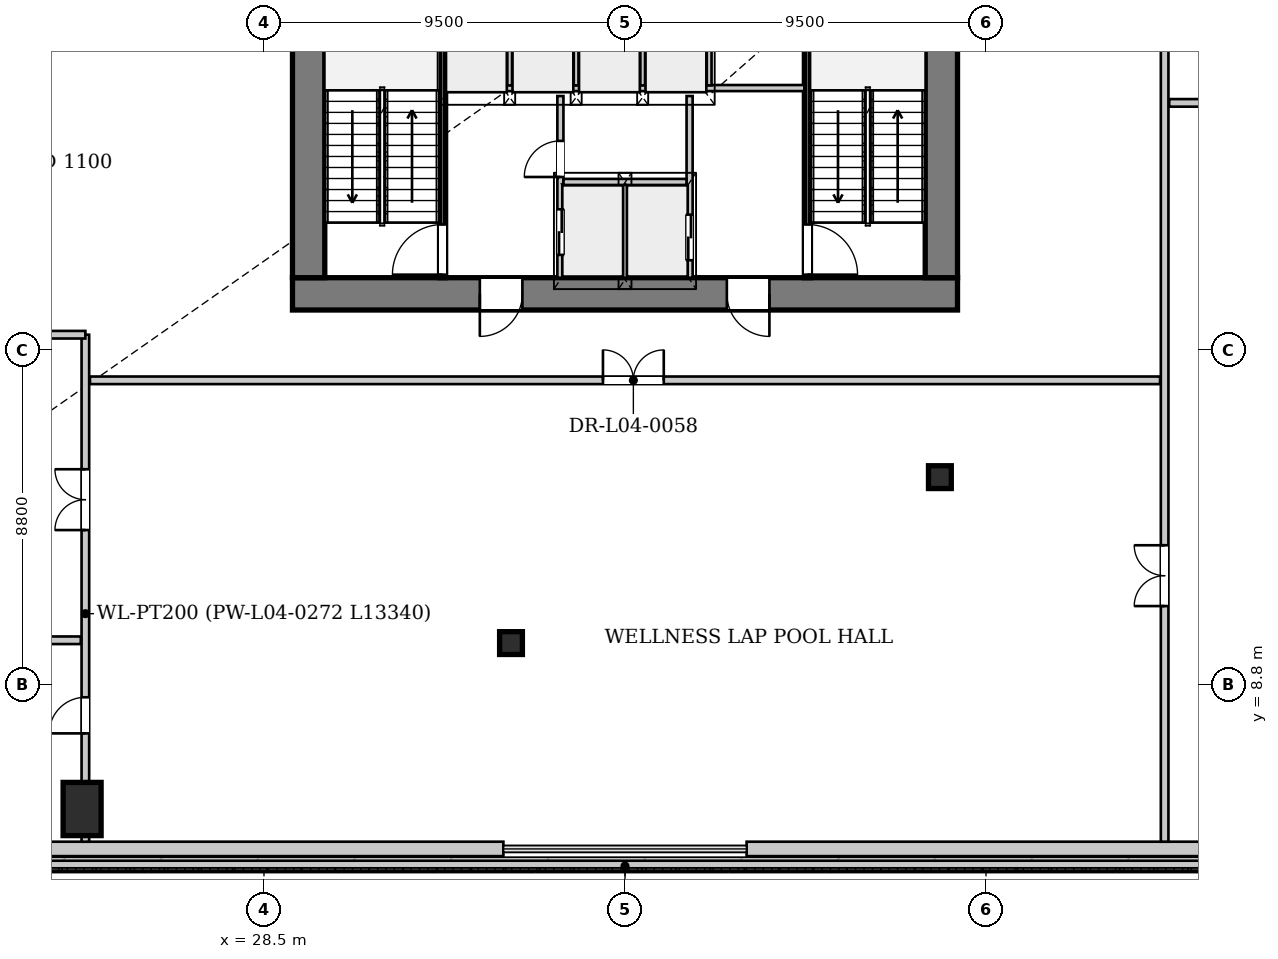
"""IFC4 building model, lengths in metres.
Left out: names, types, materials, properties, quantities, classifications, styles, units other than length and angle.
Written with IfcOpenShell. Run it as: python <this file> out.ifc"""

import sys

from ifc_helpers import new_model, si_unit, direction, frame, frame_2d, origin, origin_2d, place, context, subcontext, project, spatial, rectangle, hollow_rectangle, extrude, source, transform, mapped, element, fill, save


model = new_model("IFC4")
c1 = context("Model", 3, precision=1e-05, world=origin(), true_north=direction((0.0, 1.0)))
c2 = subcontext(c1, "Body", "Model", "MODEL_VIEW")
j1 = project(units=[si_unit("LENGTHUNIT", "METRE"), si_unit("PLANEANGLEUNIT", "RADIAN")], contexts=[c1])
p1 = place(None, origin())
s1 = spatial("IfcSite", under=j1, at=p1, CompositionType="ELEMENT")
p2 = place(p1, origin())
s2 = spatial("IfcBuilding", under=s1, at=p2, CompositionType="ELEMENT")
p3 = place(p2, frame((0.0, 0.0, 20.1)))
s3 = spatial("IfcBuildingStorey", under=s2, at=p3, CompositionType="ELEMENT", Elevation=20.1)
m1 = source(origin(), c2, "Body", "SweptSolid", [
    extrude(rectangle(XDim=1.0, YDim=1.4, at=origin_2d()), origin(), (0.0, 0.0, 1.0), 4.335),
])
p4 = place(p3, frame((23.714, 5.52, 0.0), z_axis=(0.0, 0.0, 1.0), x_axis=(1.0, 0.0, 0.0)))
e1 = element("IfcColumn", 1, at=p4, inside=s3, PredefinedType="COLUMN", context=c2, shape_type="MappedRepresentation", body=[
    mapped(m1, transform((0.0, 0.0, 0.0), x_axis=(1.0, 0.0, 0.0), y_axis=(0.0, 1.0, 0.0), z_axis=(0.0, 0.0, 1.0), scale=1.0)),
])
m2 = source(origin(), c2, "Body", "SweptSolid", [
    extrude(hollow_rectangle(XDim=0.6, YDim=0.6, WallThickness=0.035, at=origin_2d()), origin(), (0.0, 0.0, 1.0), 3.28),
])
for number, where, z_axis, x_axis in (
    (2, (35.0, 9.886, 0.0), (0.0, 0.0, 1.0), (1.0, 0.0, 0.0)),
    (3, (46.286, 14.252, 0.0), (0.0, 0.0, 1.0), (1.0, 0.0, 0.0)),
):
    element("IfcColumn", number, at=place(p3, frame(where, z_axis=z_axis, x_axis=x_axis)), inside=s3, PredefinedType="COLUMN", context=c2, shape_type="MappedRepresentation", body=[
        mapped(m2, transform((0.0, 0.0, 0.0), x_axis=(1.0, 0.0, 0.0), y_axis=(0.0, 1.0, 0.0), z_axis=(0.0, 0.0, 1.0), scale=1.0)),
    ])
p5 = place(p3, frame((69.8, 4.47, 0.0), z_axis=(0.0, 0.0, 1.0), x_axis=(-1.0, 0.0, 0.0)))
e4 = element("IfcWall", 4, at=p5, inside=s3, PredefinedType="SOLIDWALL", context=c2, shape_type="SweptSolid", body=[
    extrude(rectangle(XDim=28.6, YDim=0.38, at=frame_2d((14.3, 0.0))), origin(), (0.0, 0.0, 1.0), 3.2),
])
p6 = place(p5, frame((13.4, 0.0, 0.68)))
e5 = element("IfcOpeningElement", 5, at=p6, cuts=e4, PredefinedType="OPENING", context=c2, shape_type="SweptSolid", body=[
    extrude(rectangle(XDim=1.8, YDim=2.4, at=frame_2d((0.9, 1.2))), frame((0.0, 0.2, 0.0), z_axis=(0.0, -1.0, 0.0), x_axis=(1.0, 0.0, 0.0)), (0.0, 0.0, 1.0), 0.4),
])
p7 = place(p3, frame((34.8, 4.47, 0.0), z_axis=(0.0, 0.0, 1.0), x_axis=(-1.0, 0.0, 0.0)))
e6 = element("IfcWall", 6, at=p7, inside=s3, PredefinedType="SOLIDWALL", context=c2, shape_type="SweptSolid", body=[
    extrude(rectangle(XDim=28.6, YDim=0.38, at=frame_2d((14.3, 0.0))), origin(), (0.0, 0.0, 1.0), 3.2),
])
p8 = place(p7, frame((13.4, 0.0, 0.68)))
e7 = element("IfcOpeningElement", 7, at=p8, cuts=e6, PredefinedType="OPENING", context=c2, shape_type="SweptSolid", body=[
    extrude(rectangle(XDim=1.8, YDim=2.4, at=frame_2d((0.9, 1.2))), frame((0.0, 0.2, 0.0), z_axis=(0.0, -1.0, 0.0), x_axis=(1.0, 0.0, 0.0)), (0.0, 0.0, 1.0), 0.4),
])
p9 = place(p3, frame((5.35, 4.02, 0.0), z_axis=(0.0, 0.0, 1.0), x_axis=(1.0, 0.0, 0.0)))
e8 = element("IfcWall", 8, at=p9, inside=s3, PredefinedType="PARAPET", context=c2, shape_type="SweptSolid", body=[
    extrude(rectangle(XDim=65.3, YDim=0.28, at=frame_2d((32.65, 0.0))), origin(), (0.0, 0.0, 1.0), 0.45),
])
p10 = place(p3, frame((46.75, 19.075, 0.0), z_axis=(0.0, 0.0, 1.0), x_axis=(-1.0, 0.0, 0.0)))
e9 = element("IfcWall", 9, at=p10, inside=s3, PredefinedType="SHEAR", context=c2, shape_type="SweptSolid", body=[
    extrude(rectangle(XDim=17.5, YDim=0.85, at=frame_2d((8.75, 0.0))), origin(), (0.0, 0.0, 1.0), 4.08),
])
p11 = place(p10, frame((4.95, 0.0, 0.0)))
e10 = element("IfcOpeningElement", 10, at=p11, cuts=e9, PredefinedType="OPENING", context=c2, shape_type="SweptSolid", body=[
    extrude(rectangle(XDim=1.12, YDim=2.25, at=frame_2d((0.56, 1.125))), frame((0.0, 0.435, 0.0), z_axis=(0.0, -1.0, 0.0), x_axis=(1.0, 0.0, 0.0)), (0.0, 0.0, 1.0), 0.87),
])
p12 = place(p10, frame((11.45, 0.0, 0.0)))
e11 = element("IfcOpeningElement", 11, at=p12, cuts=e9, PredefinedType="OPENING", context=c2, shape_type="SweptSolid", body=[
    extrude(rectangle(XDim=1.12, YDim=2.25, at=frame_2d((0.56, 1.125))), frame((0.0, 0.435, 0.0), z_axis=(0.0, -1.0, 0.0), x_axis=(1.0, 0.0, 0.0)), (0.0, 0.0, 1.0), 0.87),
])
p13 = place(p3, frame((29.675, 19.5, 0.0), z_axis=(0.0, 0.0, 1.0), x_axis=(0.0, 1.0, 0.0)))
e12 = element("IfcWall", 12, at=p13, inside=s3, PredefinedType="SHEAR", context=c2, shape_type="SweptSolid", body=[
    extrude(rectangle(XDim=14.2, YDim=0.85, at=frame_2d((7.1, 0.0))), origin(), (0.0, 0.0, 1.0), 4.08),
])
p14 = place(p13, frame((7.42, 0.0, 0.0)))
e13 = element("IfcOpeningElement", 13, at=p14, cuts=e12, PredefinedType="OPENING", context=c2, shape_type="SweptSolid", body=[
    extrude(rectangle(XDim=1.6, YDim=2.2, at=frame_2d((0.8, 1.1))), frame((0.0, 0.435, 0.0), z_axis=(0.0, -1.0, 0.0), x_axis=(1.0, 0.0, 0.0)), (0.0, 0.0, 1.0), 0.87),
])
p15 = place(p3, frame((46.325, 33.7, 0.0), z_axis=(0.0, 0.0, 1.0), x_axis=(0.0, -1.0, 0.0)))
e14 = element("IfcWall", 14, at=p15, inside=s3, PredefinedType="SHEAR", context=c2, shape_type="SweptSolid", body=[
    extrude(rectangle(XDim=14.2, YDim=0.85, at=frame_2d((7.1, 0.0))), origin(), (0.0, 0.0, 1.0), 4.08),
])
p16 = place(p15, frame((5.18, 0.0, 0.0)))
e15 = element("IfcOpeningElement", 15, at=p16, cuts=e14, PredefinedType="OPENING", context=c2, shape_type="SweptSolid", body=[
    extrude(rectangle(XDim=1.6, YDim=2.2, at=frame_2d((0.8, 1.1))), frame((0.0, 0.435, 0.0), z_axis=(0.0, -1.0, 0.0), x_axis=(1.0, 0.0, 0.0)), (0.0, 0.0, 1.0), 0.87),
])
p17 = place(p3, frame((33.2, 19.5, 0.0), z_axis=(0.0, 0.0, 1.0), x_axis=(0.0, 1.0, 0.0)))
e16 = element("IfcWall", 16, at=p17, inside=s3, PredefinedType="PARTITIONING", context=c2, shape_type="SweptSolid", body=[
    extrude(rectangle(XDim=7.46, YDim=0.16, at=frame_2d((3.73, 0.0))), origin(), (0.0, 0.0, 1.0), 4.08),
])
p18 = place(p17, frame((0.08, 0.0, 0.0)))
e17 = element("IfcOpeningElement", 17, at=p18, cuts=e16, PredefinedType="OPENING", context=c2, shape_type="SweptSolid", body=[
    extrude(rectangle(XDim=1.32, YDim=2.2, at=frame_2d((0.66, 1.1))), frame((0.0, 0.09, 0.0), z_axis=(0.0, -1.0, 0.0), x_axis=(1.0, 0.0, 0.0)), (0.0, 0.0, 1.0), 0.18),
])
p19 = place(p3, frame((42.8, 26.96, 0.0), z_axis=(0.0, 0.0, 1.0), x_axis=(0.0, -1.0, 0.0)))
e18 = element("IfcWall", 18, at=p19, inside=s3, PredefinedType="PARTITIONING", context=c2, shape_type="SweptSolid", body=[
    extrude(rectangle(XDim=7.46, YDim=0.16, at=frame_2d((3.73, 0.0))), origin(), (0.0, 0.0, 1.0), 4.08),
])
p20 = place(p19, frame((6.06, 0.0, 0.0)))
e19 = element("IfcOpeningElement", 19, at=p20, cuts=e18, PredefinedType="OPENING", context=c2, shape_type="SweptSolid", body=[
    extrude(rectangle(XDim=1.32, YDim=2.2, at=frame_2d((0.66, 1.1))), frame((0.0, 0.09, 0.0), z_axis=(0.0, -1.0, 0.0), x_axis=(1.0, 0.0, 0.0)), (0.0, 0.0, 1.0), 0.18),
])
p21 = place(p3, frame((36.3, 19.5, 0.0), z_axis=(0.0, 0.0, 1.0), x_axis=(0.0, 1.0, 0.0)))
e20 = element("IfcWall", 20, at=p21, inside=s3, PredefinedType="PARTITIONING", context=c2, shape_type="SweptSolid", body=[
    extrude(rectangle(XDim=4.78, YDim=0.16, at=frame_2d((2.39, 0.0))), origin(), (0.0, 0.0, 1.0), 4.08),
])
p22 = place(p21, frame((0.6, 0.0, 0.0)))
e21 = element("IfcOpeningElement", 21, at=p22, cuts=e20, PredefinedType="OPENING", context=c2, shape_type="SweptSolid", body=[
    extrude(rectangle(XDim=1.2, YDim=2.2, at=frame_2d((0.6, 1.1))), frame((0.0, 0.09, 0.0), z_axis=(0.0, -1.0, 0.0), x_axis=(1.0, 0.0, 0.0)), (0.0, 0.0, 1.0), 0.18),
])
p23 = place(p21, frame((2.65, 0.0, 0.0)))
e22 = element("IfcOpeningElement", 22, at=p23, cuts=e20, PredefinedType="OPENING", context=c2, shape_type="SweptSolid", body=[
    extrude(rectangle(XDim=0.95, YDim=2.1, at=frame_2d((0.475, 1.05))), frame((0.0, 0.09, 0.0), z_axis=(0.0, -1.0, 0.0), x_axis=(1.0, 0.0, 0.0)), (0.0, 0.0, 1.0), 0.18),
])
p24 = place(p3, frame((39.7, 24.28, 0.0), z_axis=(0.0, 0.0, 1.0), x_axis=(0.0, -1.0, 0.0)))
e23 = element("IfcWall", 23, at=p24, inside=s3, PredefinedType="PARTITIONING", context=c2, shape_type="SweptSolid", body=[
    extrude(rectangle(XDim=4.78, YDim=0.16, at=frame_2d((2.39, 0.0))), origin(), (0.0, 0.0, 1.0), 4.08),
])
p25 = place(p24, frame((3.12, 0.0, 0.0)))
e24 = element("IfcOpeningElement", 24, at=p25, cuts=e23, PredefinedType="OPENING", context=c2, shape_type="SweptSolid", body=[
    extrude(rectangle(XDim=1.2, YDim=2.2, at=frame_2d((0.6, 1.1))), frame((0.0, 0.09, 0.0), z_axis=(0.0, -1.0, 0.0), x_axis=(1.0, 0.0, 0.0)), (0.0, 0.0, 1.0), 0.18),
])
p26 = place(p3, frame((38.0, 19.5, 0.0), z_axis=(0.0, 0.0, 1.0), x_axis=(0.0, 1.0, 0.0)))
e25 = element("IfcWall", 25, at=p26, inside=s3, PredefinedType="PARTITIONING", context=c2, shape_type="SweptSolid", body=[
    extrude(rectangle(XDim=2.46, YDim=0.125, at=frame_2d((1.23, 0.0))), origin(), (0.0, 0.0, 1.0), 4.08),
])
p27 = place(p3, frame((36.38, 22.02, 0.0), z_axis=(0.0, 0.0, 1.0), x_axis=(1.0, 0.0, 0.0)))
e26 = element("IfcWall", 26, at=p27, inside=s3, PredefinedType="PARTITIONING", context=c2, shape_type="SweptSolid", body=[
    extrude(rectangle(XDim=3.24, YDim=0.16, at=frame_2d((1.62, 0.0))), origin(), (0.0, 0.0, 1.0), 4.08),
])
p28 = place(p3, frame((33.28, 24.49, 0.0), z_axis=(0.0, 0.0, 1.0), x_axis=(1.0, 0.0, 0.0)))
e27 = element("IfcWall", 27, at=p28, inside=s3, PredefinedType="PARTITIONING", context=c2, shape_type="SweptSolid", body=[
    extrude(rectangle(XDim=9.44, YDim=0.16, at=frame_2d((4.72, 0.0))), origin(), (0.0, 0.0, 1.0), 4.08),
])
for number, where, z_axis, x_axis in (
    (28, (34.965, 24.56, 0.0), (0.0, 0.0, 1.0), (0.0, 1.0, 0.0)),
    (29, (36.715, 24.56, 0.0), (0.0, 0.0, 1.0), (0.0, 1.0, 0.0)),
    (30, (38.465, 24.56, 0.0), (0.0, 0.0, 1.0), (0.0, 1.0, 0.0)),
    (31, (40.215, 24.56, 0.0), (0.0, 0.0, 1.0), (0.0, 1.0, 0.0)),
):
    element("IfcWall", number, at=place(p3, frame(where, z_axis=z_axis, x_axis=x_axis)), inside=s3, PredefinedType="PARTITIONING", context=c2, shape_type="SweptSolid", body=[
        extrude(rectangle(XDim=2.31, YDim=0.125, at=frame_2d((1.155, 0.0))), origin(), (0.0, 0.0, 1.0), 4.08),
    ])
p29 = place(p3, frame((23.8, 4.66, 0.0), z_axis=(0.0, 0.0, 1.0), x_axis=(0.0, 1.0, 0.0)))
e32 = element("IfcWall", 32, at=p29, inside=s3, PredefinedType="PARTITIONING", context=c2, shape_type="SweptSolid", body=[
    extrude(rectangle(XDim=13.34, YDim=0.2, at=frame_2d((6.67, 0.0))), origin(), (0.0, 0.0, 1.0), 3.43),
])
p30 = place(p29, frame((2.85, 0.0, 0.0)))
e33 = element("IfcOpeningElement", 33, at=p30, cuts=e32, PredefinedType="OPENING", context=c2, shape_type="SweptSolid", body=[
    extrude(rectangle(XDim=0.95, YDim=2.1, at=frame_2d((0.475, 1.05))), frame((0.0, 0.11, 0.0), z_axis=(0.0, -1.0, 0.0), x_axis=(1.0, 0.0, 0.0)), (0.0, 0.0, 1.0), 0.22),
])
p31 = place(p29, frame((8.2, 0.0, 0.0)))
e34 = element("IfcOpeningElement", 34, at=p31, cuts=e32, PredefinedType="OPENING", context=c2, shape_type="SweptSolid", body=[
    extrude(rectangle(XDim=1.6, YDim=2.2, at=frame_2d((0.8, 1.1))), frame((0.0, 0.11, 0.0), z_axis=(0.0, -1.0, 0.0), x_axis=(1.0, 0.0, 0.0)), (0.0, 0.0, 1.0), 0.22),
])
p32 = place(p3, frame((6.58, 9.96, 0.0), z_axis=(0.0, 0.0, 1.0), x_axis=(1.0, 0.0, 0.0)))
e35 = element("IfcWall", 35, at=p32, inside=s3, PredefinedType="PARTITIONING", context=c2, shape_type="SweptSolid", body=[
    extrude(rectangle(XDim=17.1, YDim=0.2, at=frame_2d((8.55, 0.0))), origin(), (0.0, 0.0, 1.0), 3.43),
])
p33 = place(p3, frame((6.58, 18.0, 0.0), z_axis=(0.0, 0.0, 1.0), x_axis=(1.0, 0.0, 0.0)))
e36 = element("IfcWall", 36, at=p33, inside=s3, PredefinedType="PARTITIONING", context=c2, shape_type="SweptSolid", body=[
    extrude(rectangle(XDim=17.22, YDim=0.2, at=frame_2d((8.61, 0.0))), origin(), (0.0, 0.0, 1.0), 3.43),
])
p34 = place(p3, frame((23.92, 16.8, 0.0), z_axis=(0.0, 0.0, 1.0), x_axis=(1.0, 0.0, 0.0)))
e37 = element("IfcWall", 37, at=p34, inside=s3, PredefinedType="PARTITIONING", context=c2, shape_type="SweptSolid", body=[
    extrude(rectangle(XDim=28.16, YDim=0.2, at=frame_2d((14.08, 0.0))), origin(), (0.0, 0.0, 1.0), 3.43),
])
p35 = place(p34, frame((13.5, 0.0, 0.0)))
e38 = element("IfcOpeningElement", 38, at=p35, cuts=e37, PredefinedType="OPENING", context=c2, shape_type="SweptSolid", body=[
    extrude(rectangle(XDim=1.6, YDim=2.2, at=frame_2d((0.8, 1.1))), frame((0.0, 0.11, 0.0), z_axis=(0.0, -1.0, 0.0), x_axis=(1.0, 0.0, 0.0)), (0.0, 0.0, 1.0), 0.22),
])
p36 = place(p3, frame((52.2, 4.66, 0.0), z_axis=(0.0, 0.0, 1.0), x_axis=(0.0, 1.0, 0.0)))
e39 = element("IfcWall", 39, at=p36, inside=s3, PredefinedType="PARTITIONING", context=c2, shape_type="SweptSolid", body=[
    extrude(rectangle(XDim=38.14, YDim=0.2, at=frame_2d((19.07, 0.0))), origin(), (0.0, 0.0, 1.0), 3.43),
])
p37 = place(p36, frame((6.2, 0.0, 0.0)))
e40 = element("IfcOpeningElement", 40, at=p37, cuts=e39, PredefinedType="OPENING", context=c2, shape_type="SweptSolid", body=[
    extrude(rectangle(XDim=1.6, YDim=2.2, at=frame_2d((0.8, 1.1))), frame((0.0, 0.11, 0.0), z_axis=(0.0, -1.0, 0.0), x_axis=(1.0, 0.0, 0.0)), (0.0, 0.0, 1.0), 0.22),
])
p38 = place(p36, frame((22.6, 0.0, 0.0)))
e41 = element("IfcOpeningElement", 41, at=p38, cuts=e39, PredefinedType="OPENING", context=c2, shape_type="SweptSolid", body=[
    extrude(rectangle(XDim=0.92, YDim=2.1, at=frame_2d((0.46, 1.05))), frame((0.0, 0.11, 0.0), z_axis=(0.0, -1.0, 0.0), x_axis=(1.0, 0.0, 0.0)), (0.0, 0.0, 1.0), 0.22),
])
p39 = place(p36, frame((33.4, 0.0, 0.0)))
e42 = element("IfcOpeningElement", 42, at=p39, cuts=e39, PredefinedType="OPENING", context=c2, shape_type="SweptSolid", body=[
    extrude(rectangle(XDim=0.92, YDim=2.1, at=frame_2d((0.46, 1.05))), frame((0.0, 0.11, 0.0), z_axis=(0.0, -1.0, 0.0), x_axis=(1.0, 0.0, 0.0)), (0.0, 0.0, 1.0), 0.22),
])
p40 = place(p3, frame((52.32, 24.1, 0.0), z_axis=(0.0, 0.0, 1.0), x_axis=(1.0, 0.0, 0.0)))
e43 = element("IfcWall", 43, at=p40, inside=s3, PredefinedType="PARTITIONING", context=c2, shape_type="SweptSolid", body=[
    extrude(rectangle(XDim=17.1, YDim=0.2, at=frame_2d((8.55, 0.0))), origin(), (0.0, 0.0, 1.0), 3.43),
])
m3 = source(origin(), c2, "Body", "SweptSolid", [
    extrude(rectangle(XDim=1.12, YDim=2.25, at=frame_2d((0.56, 1.125))), frame((0.0, 0.025, 0.0), z_axis=(0.0, -1.0, 0.0), x_axis=(1.0, 0.0, 0.0)), (0.0, 0.0, 1.0), 0.05),
])
p41 = place(p11, origin())
e44 = element("IfcDoor", 44, at=p41, inside=s3, OperationType="SINGLE_SWING_LEFT", PredefinedType="DOOR", context=c2, shape_type="MappedRepresentation", body=[
    mapped(m3, transform((0.0, 0.0, 0.0), x_axis=(1.0, 0.0, 0.0), y_axis=(0.0, 1.0, 0.0), z_axis=(0.0, 0.0, 1.0), scale=1.0)),
])
fill(e10, e44)
p42 = place(p12, origin())
e45 = element("IfcDoor", 45, at=p42, inside=s3, OperationType="SINGLE_SWING_RIGHT", PredefinedType="DOOR", context=c2, shape_type="MappedRepresentation", body=[
    mapped(m3, transform((0.0, 0.0, 0.0), x_axis=(1.0, 0.0, 0.0), y_axis=(0.0, 1.0, 0.0), z_axis=(0.0, 0.0, 1.0), scale=1.0)),
])
fill(e11, e45)
m4 = source(origin(), c2, "Body", "SweptSolid", [
    extrude(rectangle(XDim=1.32, YDim=2.2, at=frame_2d((0.66, 1.1))), frame((0.0, 0.025, 0.0), z_axis=(0.0, -1.0, 0.0), x_axis=(1.0, 0.0, 0.0)), (0.0, 0.0, 1.0), 0.05),
])
p43 = place(p18, origin())
e46 = element("IfcDoor", 46, at=p43, inside=s3, OperationType="SINGLE_SWING_LEFT", PredefinedType="DOOR", context=c2, shape_type="MappedRepresentation", body=[
    mapped(m4, transform((0.0, 0.0, 0.0), x_axis=(1.0, 0.0, 0.0), y_axis=(0.0, 1.0, 0.0), z_axis=(0.0, 0.0, 1.0), scale=1.0)),
])
fill(e17, e46)
p44 = place(p20, origin())
e47 = element("IfcDoor", 47, at=p44, inside=s3, OperationType="SINGLE_SWING_RIGHT", PredefinedType="DOOR", context=c2, shape_type="MappedRepresentation", body=[
    mapped(m4, transform((0.0, 0.0, 0.0), x_axis=(1.0, 0.0, 0.0), y_axis=(0.0, 1.0, 0.0), z_axis=(0.0, 0.0, 1.0), scale=1.0)),
])
fill(e19, e47)
m5 = source(origin(), c2, "Body", "SweptSolid", [
    extrude(rectangle(XDim=1.2, YDim=2.2, at=frame_2d((0.6, 1.1))), frame((0.0, 0.025, 0.0), z_axis=(0.0, -1.0, 0.0), x_axis=(1.0, 0.0, 0.0)), (0.0, 0.0, 1.0), 0.05),
])
p45 = place(p22, origin())
e48 = element("IfcDoor", 48, at=p45, inside=s3, OperationType="DOUBLE_DOOR_SLIDING", PredefinedType="DOOR", context=c2, shape_type="MappedRepresentation", body=[
    mapped(m5, transform((0.0, 0.0, 0.0), x_axis=(1.0, 0.0, 0.0), y_axis=(0.0, 1.0, 0.0), z_axis=(0.0, 0.0, 1.0), scale=1.0)),
])
fill(e21, e48)
m6 = source(origin(), c2, "Body", "SweptSolid", [
    extrude(rectangle(XDim=0.95, YDim=2.1, at=frame_2d((0.475, 1.05))), frame((0.0, 0.025, 0.0), z_axis=(0.0, -1.0, 0.0), x_axis=(1.0, 0.0, 0.0)), (0.0, 0.0, 1.0), 0.05),
])
p46 = place(p23, origin())
e49 = element("IfcDoor", 49, at=p46, inside=s3, OperationType="SINGLE_SWING_LEFT", PredefinedType="DOOR", context=c2, shape_type="MappedRepresentation", body=[
    mapped(m6, transform((0.0, 0.0, 0.0), x_axis=(1.0, 0.0, 0.0), y_axis=(0.0, 1.0, 0.0), z_axis=(0.0, 0.0, 1.0), scale=1.0)),
])
fill(e22, e49)
p47 = place(p25, origin())
e50 = element("IfcDoor", 50, at=p47, inside=s3, OperationType="DOUBLE_DOOR_SLIDING", PredefinedType="DOOR", context=c2, shape_type="MappedRepresentation", body=[
    mapped(m5, transform((0.0, 0.0, 0.0), x_axis=(1.0, 0.0, 0.0), y_axis=(0.0, 1.0, 0.0), z_axis=(0.0, 0.0, 1.0), scale=1.0)),
])
fill(e24, e50)
p48 = place(p30, origin())
e51 = element("IfcDoor", 51, at=p48, inside=s3, OperationType="SINGLE_SWING_LEFT", PredefinedType="DOOR", context=c2, shape_type="MappedRepresentation", body=[
    mapped(m6, transform((0.0, 0.0, 0.0), x_axis=(1.0, 0.0, 0.0), y_axis=(0.0, 1.0, 0.0), z_axis=(0.0, 0.0, 1.0), scale=1.0)),
])
fill(e33, e51)
m7 = source(origin(), c2, "Body", "SweptSolid", [
    extrude(rectangle(XDim=1.6, YDim=2.2, at=frame_2d((0.8, 1.1))), frame((0.0, 0.025, 0.0), z_axis=(0.0, -1.0, 0.0), x_axis=(1.0, 0.0, 0.0)), (0.0, 0.0, 1.0), 0.05),
])
p49 = place(p31, origin())
e52 = element("IfcDoor", 52, at=p49, inside=s3, OperationType="DOUBLE_DOOR_SINGLE_SWING", PredefinedType="DOOR", context=c2, shape_type="MappedRepresentation", body=[
    mapped(m7, transform((0.0, 0.0, 0.0), x_axis=(1.0, 0.0, 0.0), y_axis=(0.0, 1.0, 0.0), z_axis=(0.0, 0.0, 1.0), scale=1.0)),
])
fill(e34, e52)
p50 = place(p35, origin())
e53 = element("IfcDoor", 53, at=p50, inside=s3, OperationType="DOUBLE_DOOR_SINGLE_SWING", PredefinedType="DOOR", context=c2, shape_type="MappedRepresentation", body=[
    mapped(m7, transform((0.0, 0.0, 0.0), x_axis=(1.0, 0.0, 0.0), y_axis=(0.0, 1.0, 0.0), z_axis=(0.0, 0.0, 1.0), scale=1.0)),
])
fill(e38, e53)
p51 = place(p37, origin())
e54 = element("IfcDoor", 54, at=p51, inside=s3, OperationType="DOUBLE_DOOR_SINGLE_SWING", PredefinedType="DOOR", context=c2, shape_type="MappedRepresentation", body=[
    mapped(m7, transform((0.0, 0.0, 0.0), x_axis=(1.0, 0.0, 0.0), y_axis=(0.0, 1.0, 0.0), z_axis=(0.0, 0.0, 1.0), scale=1.0)),
])
fill(e40, e54)
save(model, sys.argv[1])
